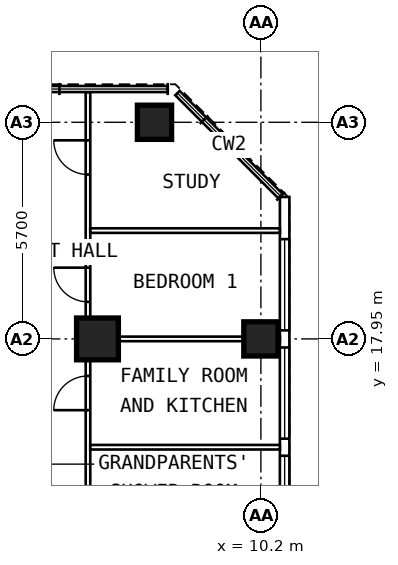
"""IFC4 building model, lengths in metres.
Left out: names, types, materials, properties, quantities, classifications, styles, units other than length and angle.
Written with IfcOpenShell. Run it as: python <this file> out.ifc"""

import sys

from ifc_helpers import new_model, si_unit, direction, frame, frame_2d, origin, origin_2d, place, context, subcontext, project, spatial, rectangle, extrude, element, fill, save


model = new_model("IFC4")
c1 = context("Model", 3, precision=1e-05, world=origin(), true_north=direction((0.0, 1.0)))
c2 = subcontext(c1, "Body", "Model", "MODEL_VIEW")
j1 = project(units=[si_unit("LENGTHUNIT", "METRE"), si_unit("PLANEANGLEUNIT", "RADIAN")], contexts=[c1])
p1 = place(None, origin())
s1 = spatial("IfcSite", under=j1, at=p1, CompositionType="ELEMENT")
p2 = place(p1, origin())
s2 = spatial("IfcBuilding", under=s1, at=p2, CompositionType="ELEMENT")
p3 = place(p2, frame((0.0, 0.0, 204.6)))
s3 = spatial("IfcBuildingStorey", under=s2, at=p3, CompositionType="ELEMENT", Elevation=204.6)
for number, where, z_axis, x_axis in (
    (1, (10.2, 17.95, 0.0), (0.0, 0.0, 1.0), (0.0, 1.0, 0.0)),
    (2, (7.4, 23.65, 0.0), (0.0, 0.0, 1.0), (0.0, 1.0, 0.0)),
):
    element("IfcColumn", number, at=place(p3, frame(where, z_axis=z_axis, x_axis=x_axis)), inside=s3, PredefinedType="COLUMN", context=c2, shape_type="SweptSolid", body=[
        extrude(rectangle(XDim=0.9, YDim=0.9, at=origin_2d()), origin(), (0.0, 0.0, 1.0), 3.6),
    ])
p4 = place(p3, frame((5.9, 17.95, 0.0), z_axis=(0.0, 0.0, 1.0), x_axis=(0.0, 1.0, 0.0)))
e3 = element("IfcColumn", 3, at=p4, inside=s3, PredefinedType="COLUMN", context=c2, shape_type="SweptSolid", body=[
    extrude(rectangle(XDim=1.1, YDim=1.1, at=origin_2d()), origin(), (0.0, 0.0, 1.0), 3.6),
])
p5 = place(p3, frame((10.825, 6.409, 0.0), z_axis=(0.0, 0.0, 1.0), x_axis=(0.0, 1.0, 0.0)))
e4 = element("IfcWall", 4, at=p5, inside=s3, PredefinedType="SOLIDWALL", context=c2, shape_type="SweptSolid", body=[
    extrude(rectangle(XDim=15.276, YDim=0.25, at=frame_2d((7.638, 0.0))), origin(), (0.0, 0.0, 1.0), 3.35),
])
p6 = place(p5, frame((0.366, 0.0, 0.8)))
e5 = element("IfcOpeningElement", 5, at=p6, cuts=e4, PredefinedType="OPENING", context=c2, shape_type="SweptSolid", body=[
    extrude(rectangle(XDim=2.4, YDim=1.8, at=frame_2d((1.2, 0.9))), frame((0.0, 0.137, 0.0), z_axis=(0.0, -1.0, 0.0), x_axis=(1.0, 0.0, 0.0)), (0.0, 0.0, 1.0), 0.274),
])
p7 = place(p5, frame((3.216, 0.0, 0.8)))
e6 = element("IfcOpeningElement", 6, at=p7, cuts=e4, PredefinedType="OPENING", context=c2, shape_type="SweptSolid", body=[
    extrude(rectangle(XDim=2.4, YDim=1.8, at=frame_2d((1.2, 0.9))), frame((0.0, 0.137, 0.0), z_axis=(0.0, -1.0, 0.0), x_axis=(1.0, 0.0, 0.0)), (0.0, 0.0, 1.0), 0.274),
])
p8 = place(p5, frame((6.066, 0.0, 0.8)))
e7 = element("IfcOpeningElement", 7, at=p8, cuts=e4, PredefinedType="OPENING", context=c2, shape_type="SweptSolid", body=[
    extrude(rectangle(XDim=2.4, YDim=1.8, at=frame_2d((1.2, 0.9))), frame((0.0, 0.137, 0.0), z_axis=(0.0, -1.0, 0.0), x_axis=(1.0, 0.0, 0.0)), (0.0, 0.0, 1.0), 0.274),
])
p9 = place(p5, frame((8.916, 0.0, 0.8)))
e8 = element("IfcOpeningElement", 8, at=p9, cuts=e4, PredefinedType="OPENING", context=c2, shape_type="SweptSolid", body=[
    extrude(rectangle(XDim=2.4, YDim=1.8, at=frame_2d((1.2, 0.9))), frame((0.0, 0.137, 0.0), z_axis=(0.0, -1.0, 0.0), x_axis=(1.0, 0.0, 0.0)), (0.0, 0.0, 1.0), 0.274),
])
p10 = place(p5, frame((11.766, 0.0, 0.8)))
e9 = element("IfcOpeningElement", 9, at=p10, cuts=e4, PredefinedType="OPENING", context=c2, shape_type="SweptSolid", body=[
    extrude(rectangle(XDim=2.4, YDim=1.8, at=frame_2d((1.2, 0.9))), frame((0.0, 0.137, 0.0), z_axis=(0.0, -1.0, 0.0), x_axis=(1.0, 0.0, 0.0)), (0.0, 0.0, 1.0), 0.274),
])
p11 = place(p3, frame((5.65, 9.6, 0.0), z_axis=(0.0, 0.0, 1.0), x_axis=(0.0, 1.0, 0.0)))
e10 = element("IfcWall", 10, at=p11, inside=s3, PredefinedType="PARTITIONING", context=c2, shape_type="SweptSolid", body=[
    extrude(rectangle(XDim=14.845, YDim=0.12, at=frame_2d((7.422, 0.0))), origin(), (0.0, 0.0, 1.0), 3.35),
])
p12 = place(p11, frame((3.35, 0.0, 0.0)))
e11 = element("IfcOpeningElement", 11, at=p12, cuts=e10, PredefinedType="OPENING", context=c2, shape_type="SweptSolid", body=[
    extrude(rectangle(XDim=0.9, YDim=2.1, at=frame_2d((0.45, 1.05))), frame((0.0, 0.072, 0.0), z_axis=(0.0, -1.0, 0.0), x_axis=(1.0, 0.0, 0.0)), (0.0, 0.0, 1.0), 0.144),
])
p13 = place(p11, frame((6.475, 0.0, 0.0)))
e12 = element("IfcOpeningElement", 12, at=p13, cuts=e10, PredefinedType="OPENING", context=c2, shape_type="SweptSolid", body=[
    extrude(rectangle(XDim=0.9, YDim=2.1, at=frame_2d((0.45, 1.05))), frame((0.0, 0.072, 0.0), z_axis=(0.0, -1.0, 0.0), x_axis=(1.0, 0.0, 0.0)), (0.0, 0.0, 1.0), 0.144),
])
p14 = place(p11, frame((9.325, 0.0, 0.0)))
e13 = element("IfcOpeningElement", 13, at=p14, cuts=e10, PredefinedType="OPENING", context=c2, shape_type="SweptSolid", body=[
    extrude(rectangle(XDim=0.9, YDim=2.1, at=frame_2d((0.45, 1.05))), frame((0.0, 0.072, 0.0), z_axis=(0.0, -1.0, 0.0), x_axis=(1.0, 0.0, 0.0)), (0.0, 0.0, 1.0), 0.144),
])
p15 = place(p11, frame((12.675, 0.0, 0.0)))
e14 = element("IfcOpeningElement", 14, at=p15, cuts=e10, PredefinedType="OPENING", context=c2, shape_type="SweptSolid", body=[
    extrude(rectangle(XDim=0.9, YDim=2.1, at=frame_2d((0.45, 1.05))), frame((0.0, 0.072, 0.0), z_axis=(0.0, -1.0, 0.0), x_axis=(1.0, 0.0, 0.0)), (0.0, 0.0, 1.0), 0.144),
])
p16 = place(p3, frame((5.71, 15.1, 0.0), z_axis=(0.0, 0.0, 1.0), x_axis=(1.0, 0.0, 0.0)))
e15 = element("IfcWall", 15, at=p16, inside=s3, PredefinedType="PARTITIONING", context=c2, shape_type="SweptSolid", body=[
    extrude(rectangle(XDim=4.99, YDim=0.12, at=frame_2d((2.495, 0.0))), origin(), (0.0, 0.0, 1.0), 3.35),
])
p17 = place(p3, frame((5.71, 17.95, 0.0), z_axis=(0.0, 0.0, 1.0), x_axis=(1.0, 0.0, 0.0)))
e16 = element("IfcWall", 16, at=p17, inside=s3, PredefinedType="PARTITIONING", context=c2, shape_type="SweptSolid", body=[
    extrude(rectangle(XDim=4.99, YDim=0.12, at=frame_2d((2.495, 0.0))), origin(), (0.0, 0.0, 1.0), 2.45),
])
p18 = place(p3, frame((5.71, 20.8, 0.0), z_axis=(0.0, 0.0, 1.0), x_axis=(1.0, 0.0, 0.0)))
e17 = element("IfcWall", 17, at=p18, inside=s3, PredefinedType="PARTITIONING", context=c2, shape_type="SweptSolid", body=[
    extrude(rectangle(XDim=4.99, YDim=0.12, at=frame_2d((2.495, 0.0))), origin(), (0.0, 0.0, 1.0), 3.35),
])
p19 = place(p8, origin())
e18 = element("IfcWindow", 18, at=p19, inside=s3, PartitioningType="SINGLE_PANEL", PredefinedType="WINDOW", context=c2, shape_type="SweptSolid", body=[
    extrude(rectangle(XDim=2.4, YDim=1.8, at=frame_2d((1.2, 0.9))), frame((0.0, 0.03, 0.0), z_axis=(0.0, -1.0, 0.0), x_axis=(1.0, 0.0, 0.0)), (0.0, 0.0, 1.0), 0.06),
])
fill(e7, e18)
p20 = place(p9, origin())
e19 = element("IfcWindow", 19, at=p20, inside=s3, PartitioningType="SINGLE_PANEL", PredefinedType="WINDOW", context=c2, shape_type="SweptSolid", body=[
    extrude(rectangle(XDim=2.4, YDim=1.8, at=frame_2d((1.2, 0.9))), frame((0.0, 0.03, 0.0), z_axis=(0.0, -1.0, 0.0), x_axis=(1.0, 0.0, 0.0)), (0.0, 0.0, 1.0), 0.06),
])
fill(e8, e19)
p21 = place(p10, origin())
e20 = element("IfcWindow", 20, at=p21, inside=s3, PartitioningType="SINGLE_PANEL", PredefinedType="WINDOW", context=c2, shape_type="SweptSolid", body=[
    extrude(rectangle(XDim=2.4, YDim=1.8, at=frame_2d((1.2, 0.9))), frame((0.0, 0.03, 0.0), z_axis=(0.0, -1.0, 0.0), x_axis=(1.0, 0.0, 0.0)), (0.0, 0.0, 1.0), 0.06),
])
fill(e9, e20)
p22 = place(p13, origin())
e21 = element("IfcDoor", 21, at=p22, inside=s3, OperationType="SINGLE_SWING_LEFT", PredefinedType="DOOR", context=c2, shape_type="SweptSolid", body=[
    extrude(rectangle(XDim=0.9, YDim=2.1, at=frame_2d((0.45, 1.05))), frame((0.0, 0.025, 0.0), z_axis=(0.0, -1.0, 0.0), x_axis=(1.0, 0.0, 0.0)), (0.0, 0.0, 1.0), 0.05),
])
fill(e12, e21)
p23 = place(p14, origin())
e22 = element("IfcDoor", 22, at=p23, inside=s3, OperationType="SINGLE_SWING_RIGHT", PredefinedType="DOOR", context=c2, shape_type="SweptSolid", body=[
    extrude(rectangle(XDim=0.9, YDim=2.1, at=frame_2d((0.45, 1.05))), frame((0.0, 0.025, 0.0), z_axis=(0.0, -1.0, 0.0), x_axis=(1.0, 0.0, 0.0)), (0.0, 0.0, 1.0), 0.05),
])
fill(e13, e22)
p24 = place(p15, origin())
e23 = element("IfcDoor", 23, at=p24, inside=s3, OperationType="SINGLE_SWING_RIGHT", PredefinedType="DOOR", context=c2, shape_type="SweptSolid", body=[
    extrude(rectangle(XDim=0.9, YDim=2.1, at=frame_2d((0.45, 1.05))), frame((0.0, 0.025, 0.0), z_axis=(0.0, -1.0, 0.0), x_axis=(1.0, 0.0, 0.0)), (0.0, 0.0, 1.0), 0.05),
])
fill(e14, e23)
save(model, sys.argv[1])
